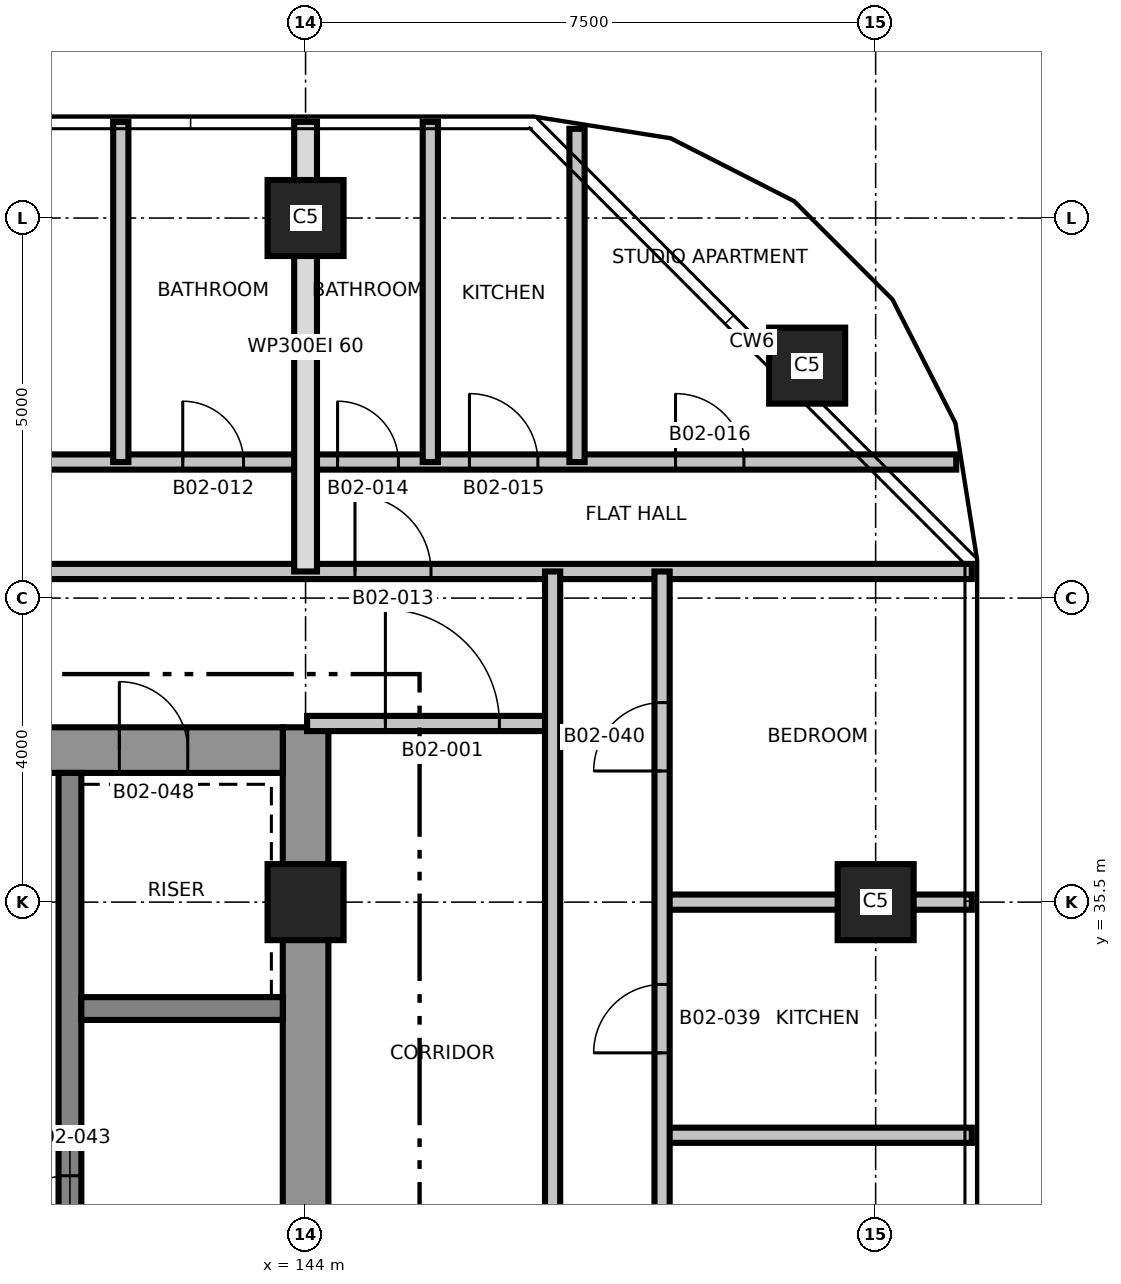
"""IFC4 building model, lengths in metres.
Left out: names, types, materials, properties, quantities, classifications, styles, units other than length and angle.
Written with IfcOpenShell. Run it as: python <this file> out.ifc"""

import sys

from ifc_helpers import new_model, si_unit, direction, frame, frame_2d, origin, origin_2d, place, context, subcontext, project, spatial, rectangle, extrude, element, fill, save


model = new_model("IFC4")
c1 = context("Model", 3, precision=1e-05, world=origin(), true_north=direction((0.0, 1.0)))
c2 = subcontext(c1, "Body", "Model", "MODEL_VIEW")
j1 = project(units=[si_unit("LENGTHUNIT", "METRE"), si_unit("PLANEANGLEUNIT", "RADIAN")], contexts=[c1])
p1 = place(None, origin())
s1 = spatial("IfcSite", under=j1, at=p1, CompositionType="ELEMENT")
p2 = place(p1, origin())
s2 = spatial("IfcBuilding", under=s1, at=p2, CompositionType="ELEMENT")
p3 = place(p2, frame((0.0, 0.0, 48.3)))
s3 = spatial("IfcBuildingStorey", under=s2, at=p3, CompositionType="ELEMENT", Elevation=48.3)
p4 = place(p3, frame((144.0, 24.2, 0.0), z_axis=(0.0, 0.0, 1.0), x_axis=(0.0, 1.0, 0.0)))
e1 = element("IfcWall", 1, at=p4, inside=s3, PredefinedType="SHEAR", context=c2, shape_type="SweptSolid", body=[
    extrude(rectangle(XDim=13.6, YDim=0.6, at=frame_2d((6.8, 0.0))), origin(), (0.0, 0.0, 1.0), 3.7),
])
p5 = place(p3, frame((128.7, 37.5, 0.0), z_axis=(0.0, 0.0, 1.0), x_axis=(1.0, 0.0, 0.0)))
e2 = element("IfcWall", 2, at=p5, inside=s3, PredefinedType="SHEAR", context=c2, shape_type="SweptSolid", body=[
    extrude(rectangle(XDim=15.0, YDim=0.6, at=frame_2d((7.5, 0.0))), origin(), (0.0, 0.0, 1.0), 3.7),
])
p6 = place(p5, frame((9.65, 0.0, 0.0)))
e3 = element("IfcOpeningElement", 3, at=p6, cuts=e2, PredefinedType="OPENING", context=c2, shape_type="SweptSolid", body=[
    extrude(rectangle(XDim=1.5, YDim=2.1, at=frame_2d((0.75, 1.05))), frame((0.0, 0.31, 0.0), z_axis=(0.0, -1.0, 0.0), x_axis=(1.0, 0.0, 0.0)), (0.0, 0.0, 1.0), 0.62),
])
p7 = place(p5, frame((12.85, 0.0, 0.0)))
e4 = element("IfcOpeningElement", 4, at=p7, cuts=e2, PredefinedType="OPENING", context=c2, shape_type="SweptSolid", body=[
    extrude(rectangle(XDim=0.9, YDim=2.1, at=frame_2d((0.45, 1.05))), frame((0.0, 0.31, 0.0), z_axis=(0.0, -1.0, 0.0), x_axis=(1.0, 0.0, 0.0)), (0.0, 0.0, 1.0), 0.62),
])
p8 = place(p5, frame((5.55, 0.0, 0.0)))
e5 = element("IfcOpeningElement", 5, at=p8, cuts=e2, PredefinedType="OPENING", context=c2, shape_type="SweptSolid", body=[
    extrude(rectangle(XDim=0.9, YDim=2.1, at=frame_2d((0.45, 1.05))), frame((0.0, 0.31, 0.0), z_axis=(0.0, -1.0, 0.0), x_axis=(1.0, 0.0, 0.0)), (0.0, 0.0, 1.0), 0.62),
])
p9 = place(p3, frame((140.9, 24.8, 0.0), z_axis=(0.0, 0.0, 1.0), x_axis=(0.0, 1.0, 0.0)))
e6 = element("IfcWall", 6, at=p9, inside=s3, PredefinedType="SHEAR", context=c2, shape_type="SweptSolid", body=[
    extrude(rectangle(XDim=12.4, YDim=0.3, at=frame_2d((6.2, 0.0))), origin(), (0.0, 0.0, 1.0), 3.7),
])
p10 = place(p9, frame((5.9, 0.0, 0.0)))
e7 = element("IfcOpeningElement", 7, at=p10, cuts=e6, PredefinedType="OPENING", context=c2, shape_type="SweptSolid", body=[
    extrude(rectangle(XDim=1.2, YDim=2.1, at=frame_2d((0.6, 1.05))), frame((0.0, 0.16, 0.0), z_axis=(0.0, -1.0, 0.0), x_axis=(1.0, 0.0, 0.0)), (0.0, 0.0, 1.0), 0.32),
])
p11 = place(p3, frame((141.05, 34.1, 0.0), z_axis=(0.0, 0.0, 1.0), x_axis=(1.0, 0.0, 0.0)))
e8 = element("IfcWall", 8, at=p11, inside=s3, PredefinedType="SHEAR", context=c2, shape_type="SweptSolid", body=[
    extrude(rectangle(XDim=2.65, YDim=0.3, at=frame_2d((1.325, 0.0))), origin(), (0.0, 0.0, 1.0), 3.7),
])
for number, where, z_axis, x_axis in (
    (9, (144.0, 35.5, 0.0), (0.0, 0.0, 1.0), (1.0, 0.0, 0.0)),
    (10, (151.5, 35.5, 0.0), (0.0, 0.0, 1.0), (1.0, 0.0, 0.0)),
    (11, (150.599, 42.558, 0.0), (0.0, 0.0, 1.0), (1.0, 0.0, 0.0)),
    (12, (144.0, 44.5, 0.0), (0.0, 0.0, 1.0), (1.0, 0.0, 0.0)),
):
    element("IfcColumn", number, at=place(p3, frame(where, z_axis=z_axis, x_axis=x_axis)), inside=s3, PredefinedType="COLUMN", context=c2, shape_type="SweptSolid", body=[
        extrude(rectangle(XDim=1.0, YDim=1.0, at=origin_2d()), origin(), (0.0, 0.0, 1.0), 3.7),
    ])
for number, where, z_axis, x_axis in (
    (13, (148.69, 32.433, 0.0), (0.0, 0.0, 1.0), (1.0, 0.0, 0.0)),
    (14, (148.69, 35.5, 0.0), (0.0, 0.0, 1.0), (1.0, 0.0, 0.0)),
):
    element("IfcWall", number, at=place(p3, frame(where, z_axis=z_axis, x_axis=x_axis)), inside=s3, PredefinedType="PARTITIONING", context=c2, shape_type="SweptSolid", body=[
        extrude(rectangle(XDim=4.075, YDim=0.2, at=frame_2d((2.038, 0.0))), origin(), (0.0, 0.0, 1.0), 3.4),
    ])
p12 = place(p3, frame((144.02, 37.85, 0.0), z_axis=(0.0, 0.0, 1.0), x_axis=(1.0, 0.0, 0.0)))
e15 = element("IfcWall", 15, at=p12, inside=s3, PredefinedType="PARTITIONING", context=c2, shape_type="SweptSolid", body=[
    extrude(rectangle(XDim=3.23, YDim=0.2, at=frame_2d((1.615, 0.0))), origin(), (0.0, 0.0, 1.0), 3.4),
])
p13 = place(p12, frame((1.03, 0.0, 0.0)))
e16 = element("IfcOpeningElement", 16, at=p13, cuts=e15, PredefinedType="OPENING", context=c2, shape_type="SweptSolid", body=[
    extrude(rectangle(XDim=1.5, YDim=2.1, at=frame_2d((0.75, 1.05))), frame((0.0, 0.11, 0.0), z_axis=(0.0, -1.0, 0.0), x_axis=(1.0, 0.0, 0.0)), (0.0, 0.0, 1.0), 0.22),
])
p14 = place(p3, frame((120.235, 39.85, 0.0), z_axis=(0.0, 0.0, 1.0), x_axis=(1.0, 0.0, 0.0)))
e17 = element("IfcWall", 17, at=p14, inside=s3, PredefinedType="PARTITIONING", context=c2, shape_type="SweptSolid", body=[
    extrude(rectangle(XDim=32.53, YDim=0.2, at=frame_2d((16.265, 0.0))), origin(), (0.0, 0.0, 1.0), 3.4),
])
p15 = place(p14, frame((7.115, 0.0, 0.0)))
e18 = element("IfcOpeningElement", 18, at=p15, cuts=e17, PredefinedType="OPENING", context=c2, shape_type="SweptSolid", body=[
    extrude(rectangle(XDim=1.0, YDim=2.1, at=frame_2d((0.5, 1.05))), frame((0.0, 0.11, 0.0), z_axis=(0.0, -1.0, 0.0), x_axis=(1.0, 0.0, 0.0)), (0.0, 0.0, 1.0), 0.22),
])
p16 = place(p14, frame((15.765, 0.0, 0.0)))
e19 = element("IfcOpeningElement", 19, at=p16, cuts=e17, PredefinedType="OPENING", context=c2, shape_type="SweptSolid", body=[
    extrude(rectangle(XDim=1.0, YDim=2.1, at=frame_2d((0.5, 1.05))), frame((0.0, 0.11, 0.0), z_axis=(0.0, -1.0, 0.0), x_axis=(1.0, 0.0, 0.0)), (0.0, 0.0, 1.0), 0.22),
])
p17 = place(p14, frame((24.415, 0.0, 0.0)))
e20 = element("IfcOpeningElement", 20, at=p17, cuts=e17, PredefinedType="OPENING", context=c2, shape_type="SweptSolid", body=[
    extrude(rectangle(XDim=1.0, YDim=2.1, at=frame_2d((0.5, 1.05))), frame((0.0, 0.11, 0.0), z_axis=(0.0, -1.0, 0.0), x_axis=(1.0, 0.0, 0.0)), (0.0, 0.0, 1.0), 0.22),
])
p18 = place(p3, frame((120.44, 41.29, 0.0), z_axis=(0.0, 0.0, 1.0), x_axis=(1.0, 0.0, 0.0)))
e21 = element("IfcWall", 21, at=p18, inside=s3, PredefinedType="PARTITIONING", context=c2, shape_type="SweptSolid", body=[
    extrude(rectangle(XDim=32.12, YDim=0.2, at=frame_2d((16.06, 0.0))), origin(), (0.0, 0.0, 1.0), 3.4),
])
p19 = place(p18, frame((2.793, 0.0, 0.0)))
e22 = element("IfcOpeningElement", 22, at=p19, cuts=e21, PredefinedType="OPENING", context=c2, shape_type="SweptSolid", body=[
    extrude(rectangle(XDim=0.9, YDim=2.1, at=frame_2d((0.45, 1.05))), frame((0.0, 0.11, 0.0), z_axis=(0.0, -1.0, 0.0), x_axis=(1.0, 0.0, 0.0)), (0.0, 0.0, 1.0), 0.22),
])
p20 = place(p18, frame((5.504, 0.0, 0.0)))
e23 = element("IfcOpeningElement", 23, at=p20, cuts=e21, PredefinedType="OPENING", context=c2, shape_type="SweptSolid", body=[
    extrude(rectangle(XDim=0.9, YDim=2.1, at=frame_2d((0.45, 1.05))), frame((0.0, 0.11, 0.0), z_axis=(0.0, -1.0, 0.0), x_axis=(1.0, 0.0, 0.0)), (0.0, 0.0, 1.0), 0.22),
])
p21 = place(p18, frame((7.339, 0.0, 0.0)))
e24 = element("IfcOpeningElement", 24, at=p21, cuts=e21, PredefinedType="OPENING", context=c2, shape_type="SweptSolid", body=[
    extrude(rectangle(XDim=0.8, YDim=2.1, at=frame_2d((0.4, 1.05))), frame((0.0, 0.11, 0.0), z_axis=(0.0, -1.0, 0.0), x_axis=(1.0, 0.0, 0.0)), (0.0, 0.0, 1.0), 0.22),
])
p22 = place(p18, frame((10.577, 0.0, 0.0)))
e25 = element("IfcOpeningElement", 25, at=p22, cuts=e21, PredefinedType="OPENING", context=c2, shape_type="SweptSolid", body=[
    extrude(rectangle(XDim=0.9, YDim=2.1, at=frame_2d((0.45, 1.05))), frame((0.0, 0.11, 0.0), z_axis=(0.0, -1.0, 0.0), x_axis=(1.0, 0.0, 0.0)), (0.0, 0.0, 1.0), 0.22),
])
p23 = place(p18, frame((14.327, 0.0, 0.0)))
e26 = element("IfcOpeningElement", 26, at=p23, cuts=e21, PredefinedType="OPENING", context=c2, shape_type="SweptSolid", body=[
    extrude(rectangle(XDim=0.9, YDim=2.1, at=frame_2d((0.45, 1.05))), frame((0.0, 0.11, 0.0), z_axis=(0.0, -1.0, 0.0), x_axis=(1.0, 0.0, 0.0)), (0.0, 0.0, 1.0), 0.22),
])
p24 = place(p18, frame((18.144, 0.0, 0.0)))
e27 = element("IfcOpeningElement", 27, at=p24, cuts=e21, PredefinedType="OPENING", context=c2, shape_type="SweptSolid", body=[
    extrude(rectangle(XDim=0.9, YDim=2.1, at=frame_2d((0.45, 1.05))), frame((0.0, 0.11, 0.0), z_axis=(0.0, -1.0, 0.0), x_axis=(1.0, 0.0, 0.0)), (0.0, 0.0, 1.0), 0.22),
])
p25 = place(p18, frame((21.944, 0.0, 0.0)))
e28 = element("IfcOpeningElement", 28, at=p25, cuts=e21, PredefinedType="OPENING", context=c2, shape_type="SweptSolid", body=[
    extrude(rectangle(XDim=0.8, YDim=2.1, at=frame_2d((0.4, 1.05))), frame((0.0, 0.11, 0.0), z_axis=(0.0, -1.0, 0.0), x_axis=(1.0, 0.0, 0.0)), (0.0, 0.0, 1.0), 0.22),
])
p26 = place(p18, frame((23.981, 0.0, 0.0)))
e29 = element("IfcOpeningElement", 29, at=p26, cuts=e21, PredefinedType="OPENING", context=c2, shape_type="SweptSolid", body=[
    extrude(rectangle(XDim=0.8, YDim=2.1, at=frame_2d((0.4, 1.05))), frame((0.0, 0.11, 0.0), z_axis=(0.0, -1.0, 0.0), x_axis=(1.0, 0.0, 0.0)), (0.0, 0.0, 1.0), 0.22),
])
p27 = place(p18, frame((25.716, 0.0, 0.0)))
e30 = element("IfcOpeningElement", 30, at=p27, cuts=e21, PredefinedType="OPENING", context=c2, shape_type="SweptSolid", body=[
    extrude(rectangle(XDim=0.9, YDim=2.1, at=frame_2d((0.45, 1.05))), frame((0.0, 0.11, 0.0), z_axis=(0.0, -1.0, 0.0), x_axis=(1.0, 0.0, 0.0)), (0.0, 0.0, 1.0), 0.22),
])
p28 = place(p18, frame((28.427, 0.0, 0.0)))
e31 = element("IfcOpeningElement", 31, at=p28, cuts=e21, PredefinedType="OPENING", context=c2, shape_type="SweptSolid", body=[
    extrude(rectangle(XDim=0.9, YDim=2.1, at=frame_2d((0.45, 1.05))), frame((0.0, 0.11, 0.0), z_axis=(0.0, -1.0, 0.0), x_axis=(1.0, 0.0, 0.0)), (0.0, 0.0, 1.0), 0.22),
])
p29 = place(p3, frame((141.569, 41.29, 0.0), z_axis=(0.0, 0.0, 1.0), x_axis=(0.0, 1.0, 0.0)))
e32 = element("IfcWall", 32, at=p29, inside=s3, PredefinedType="PARTITIONING", context=c2, shape_type="SweptSolid", body=[
    extrude(rectangle(XDim=4.475, YDim=0.2, at=frame_2d((2.237, 0.0))), origin(), (0.0, 0.0, 1.0), 3.4),
])
p30 = place(p3, frame((144.0, 39.85, 0.0), z_axis=(0.0, 0.0, 1.0), x_axis=(0.0, 1.0, 0.0)))
e33 = element("IfcWall", 33, at=p30, inside=s3, PredefinedType="PARTITIONING", context=c2, shape_type="SweptSolid", body=[
    extrude(rectangle(XDim=5.915, YDim=0.3, at=frame_2d((2.958, 0.0))), origin(), (0.0, 0.0, 1.0), 3.4),
])
p31 = place(p3, frame((145.641, 41.29, 0.0), z_axis=(0.0, 0.0, 1.0), x_axis=(0.0, 1.0, 0.0)))
e34 = element("IfcWall", 34, at=p31, inside=s3, PredefinedType="PARTITIONING", context=c2, shape_type="SweptSolid", body=[
    extrude(rectangle(XDim=4.475, YDim=0.2, at=frame_2d((2.237, 0.0))), origin(), (0.0, 0.0, 1.0), 3.4),
])
p32 = place(p3, frame((147.25, 22.15, 0.0), z_axis=(0.0, 0.0, 1.0), x_axis=(0.0, 1.0, 0.0)))
e35 = element("IfcWall", 35, at=p32, inside=s3, PredefinedType="PARTITIONING", context=c2, shape_type="SweptSolid", body=[
    extrude(rectangle(XDim=17.7, YDim=0.2, at=frame_2d((8.85, 0.0))), origin(), (0.0, 0.0, 1.0), 3.4),
])
p33 = place(p32, frame((2.65, 0.0, 0.0)))
e36 = element("IfcOpeningElement", 36, at=p33, cuts=e35, PredefinedType="OPENING", context=c2, shape_type="SweptSolid", body=[
    extrude(rectangle(XDim=1.0, YDim=2.1, at=frame_2d((0.5, 1.05))), frame((0.0, 0.11, 0.0), z_axis=(0.0, -1.0, 0.0), x_axis=(1.0, 0.0, 0.0)), (0.0, 0.0, 1.0), 0.22),
])
p34 = place(p3, frame((147.571, 41.29, 0.0), z_axis=(0.0, 0.0, 1.0), x_axis=(0.0, 1.0, 0.0)))
e37 = element("IfcWall", 37, at=p34, inside=s3, PredefinedType="PARTITIONING", context=c2, shape_type="SweptSolid", body=[
    extrude(rectangle(XDim=4.384, YDim=0.2, at=frame_2d((2.192, 0.0))), origin(), (0.0, 0.0, 1.0), 3.4),
])
p35 = place(p3, frame((148.69, 22.15, 0.0), z_axis=(0.0, 0.0, 1.0), x_axis=(0.0, 1.0, 0.0)))
e38 = element("IfcWall", 38, at=p35, inside=s3, PredefinedType="PARTITIONING", context=c2, shape_type="SweptSolid", body=[
    extrude(rectangle(XDim=17.7, YDim=0.2, at=frame_2d((8.85, 0.0))), origin(), (0.0, 0.0, 1.0), 3.4),
])
p36 = place(p35, frame((1.028, 0.0, 0.0)))
e39 = element("IfcOpeningElement", 39, at=p36, cuts=e38, PredefinedType="OPENING", context=c2, shape_type="SweptSolid", body=[
    extrude(rectangle(XDim=0.9, YDim=2.1, at=frame_2d((0.45, 1.05))), frame((0.0, 0.11, 0.0), z_axis=(0.0, -1.0, 0.0), x_axis=(1.0, 0.0, 0.0)), (0.0, 0.0, 1.0), 0.22),
])
p37 = place(p35, frame((3.253, 0.0, 0.0)))
e40 = element("IfcOpeningElement", 40, at=p37, cuts=e38, PredefinedType="OPENING", context=c2, shape_type="SweptSolid", body=[
    extrude(rectangle(XDim=0.8, YDim=2.1, at=frame_2d((0.4, 1.05))), frame((0.0, 0.11, 0.0), z_axis=(0.0, -1.0, 0.0), x_axis=(1.0, 0.0, 0.0)), (0.0, 0.0, 1.0), 0.22),
])
p38 = place(p35, frame((6.867, 0.0, 0.0)))
e41 = element("IfcOpeningElement", 41, at=p38, cuts=e38, PredefinedType="OPENING", context=c2, shape_type="SweptSolid", body=[
    extrude(rectangle(XDim=0.9, YDim=2.1, at=frame_2d((0.45, 1.05))), frame((0.0, 0.11, 0.0), z_axis=(0.0, -1.0, 0.0), x_axis=(1.0, 0.0, 0.0)), (0.0, 0.0, 1.0), 0.22),
])
p39 = place(p35, frame((11.367, 0.0, 0.0)))
e42 = element("IfcOpeningElement", 42, at=p39, cuts=e38, PredefinedType="OPENING", context=c2, shape_type="SweptSolid", body=[
    extrude(rectangle(XDim=0.9, YDim=2.1, at=frame_2d((0.45, 1.05))), frame((0.0, 0.11, 0.0), z_axis=(0.0, -1.0, 0.0), x_axis=(1.0, 0.0, 0.0)), (0.0, 0.0, 1.0), 0.22),
])
p40 = place(p35, frame((15.075, 0.0, 0.0)))
e43 = element("IfcOpeningElement", 43, at=p40, cuts=e38, PredefinedType="OPENING", context=c2, shape_type="SweptSolid", body=[
    extrude(rectangle(XDim=0.9, YDim=2.1, at=frame_2d((0.45, 1.05))), frame((0.0, 0.11, 0.0), z_axis=(0.0, -1.0, 0.0), x_axis=(1.0, 0.0, 0.0)), (0.0, 0.0, 1.0), 0.22),
])
p41 = place(p13, origin())
e44 = element("IfcDoor", 44, at=p41, inside=s3, OperationType="SINGLE_SWING_LEFT", PredefinedType="DOOR", context=c2, shape_type="SweptSolid", body=[
    extrude(rectangle(XDim=1.5, YDim=2.1, at=frame_2d((0.75, 1.05))), frame((0.0, 0.025, 0.0), z_axis=(0.0, -1.0, 0.0), x_axis=(1.0, 0.0, 0.0)), (0.0, 0.0, 1.0), 0.05),
])
fill(e16, e44)
p42 = place(p25, origin())
e45 = element("IfcDoor", 45, at=p42, inside=s3, OperationType="SINGLE_SWING_RIGHT", PredefinedType="DOOR", context=c2, shape_type="SweptSolid", body=[
    extrude(rectangle(XDim=0.8, YDim=2.1, at=frame_2d((0.4, 1.05))), frame((0.0, 0.025, 0.0), z_axis=(0.0, -1.0, 0.0), x_axis=(1.0, 0.0, 0.0)), (0.0, 0.0, 1.0), 0.05),
])
fill(e28, e45)
p43 = place(p17, origin())
e46 = element("IfcDoor", 46, at=p43, inside=s3, OperationType="SINGLE_SWING_LEFT", PredefinedType="DOOR", context=c2, shape_type="SweptSolid", body=[
    extrude(rectangle(XDim=1.0, YDim=2.1, at=frame_2d((0.5, 1.05))), frame((0.0, 0.025, 0.0), z_axis=(0.0, -1.0, 0.0), x_axis=(1.0, 0.0, 0.0)), (0.0, 0.0, 1.0), 0.05),
])
fill(e20, e46)
p44 = place(p26, origin())
e47 = element("IfcDoor", 47, at=p44, inside=s3, OperationType="SINGLE_SWING_RIGHT", PredefinedType="DOOR", context=c2, shape_type="SweptSolid", body=[
    extrude(rectangle(XDim=0.8, YDim=2.1, at=frame_2d((0.4, 1.05))), frame((0.0, 0.025, 0.0), z_axis=(0.0, -1.0, 0.0), x_axis=(1.0, 0.0, 0.0)), (0.0, 0.0, 1.0), 0.05),
])
fill(e29, e47)
p45 = place(p27, origin())
e48 = element("IfcDoor", 48, at=p45, inside=s3, OperationType="SINGLE_SWING_LEFT", PredefinedType="DOOR", context=c2, shape_type="SweptSolid", body=[
    extrude(rectangle(XDim=0.9, YDim=2.1, at=frame_2d((0.45, 1.05))), frame((0.0, 0.025, 0.0), z_axis=(0.0, -1.0, 0.0), x_axis=(1.0, 0.0, 0.0)), (0.0, 0.0, 1.0), 0.05),
])
fill(e30, e48)
p46 = place(p28, origin())
e49 = element("IfcDoor", 49, at=p46, inside=s3, OperationType="SINGLE_SWING_RIGHT", PredefinedType="DOOR", context=c2, shape_type="SweptSolid", body=[
    extrude(rectangle(XDim=0.9, YDim=2.1, at=frame_2d((0.45, 1.05))), frame((0.0, 0.025, 0.0), z_axis=(0.0, -1.0, 0.0), x_axis=(1.0, 0.0, 0.0)), (0.0, 0.0, 1.0), 0.05),
])
fill(e31, e49)
p47 = place(p39, origin())
e50 = element("IfcDoor", 50, at=p47, inside=s3, OperationType="SINGLE_SWING_LEFT", PredefinedType="DOOR", context=c2, shape_type="SweptSolid", body=[
    extrude(rectangle(XDim=0.9, YDim=2.1, at=frame_2d((0.45, 1.05))), frame((0.0, 0.025, 0.0), z_axis=(0.0, -1.0, 0.0), x_axis=(1.0, 0.0, 0.0)), (0.0, 0.0, 1.0), 0.05),
])
fill(e42, e50)
p48 = place(p40, origin())
e51 = element("IfcDoor", 51, at=p48, inside=s3, OperationType="SINGLE_SWING_RIGHT", PredefinedType="DOOR", context=c2, shape_type="SweptSolid", body=[
    extrude(rectangle(XDim=0.9, YDim=2.1, at=frame_2d((0.45, 1.05))), frame((0.0, 0.025, 0.0), z_axis=(0.0, -1.0, 0.0), x_axis=(1.0, 0.0, 0.0)), (0.0, 0.0, 1.0), 0.05),
])
fill(e43, e51)
p49 = place(p10, origin())
e52 = element("IfcDoor", 52, at=p49, inside=s3, OperationType="SINGLE_SWING_RIGHT", PredefinedType="DOOR", context=c2, shape_type="SweptSolid", body=[
    extrude(rectangle(XDim=1.2, YDim=2.1, at=frame_2d((0.6, 1.05))), frame((0.0, 0.025, 0.0), z_axis=(0.0, -1.0, 0.0), x_axis=(1.0, 0.0, 0.0)), (0.0, 0.0, 1.0), 0.05),
])
fill(e7, e52)
p50 = place(p7, origin())
e53 = element("IfcDoor", 53, at=p50, inside=s3, OperationType="SINGLE_SWING_RIGHT", PredefinedType="DOOR", context=c2, shape_type="SweptSolid", body=[
    extrude(rectangle(XDim=0.9, YDim=2.1, at=frame_2d((0.45, 1.05))), frame((0.0, 0.025, 0.0), z_axis=(0.0, -1.0, 0.0), x_axis=(1.0, 0.0, 0.0)), (0.0, 0.0, 1.0), 0.05),
])
fill(e4, e53)
save(model, sys.argv[1])
